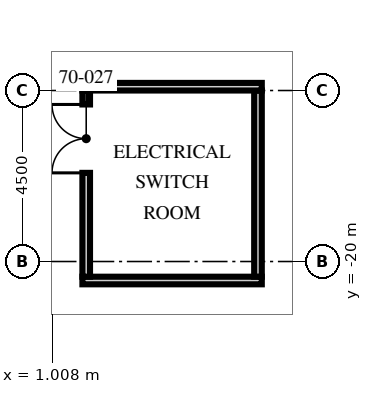
"""IFC4 building model, lengths in metres.
Left out: names, types, materials, properties, quantities, classifications, styles, units other than length and angle.
Written with IfcOpenShell. Run it as: python <this file> out.ifc"""

import sys

from ifc_helpers import new_model, si_unit, direction, frame, frame_2d, origin, origin_2d, place, context, subcontext, project, spatial, rectangle, extrude, element, fill, save


model = new_model("IFC4")
c1 = context("Model", 3, precision=1e-05, world=origin(), true_north=direction((0.0, 1.0)))
c2 = subcontext(c1, "Body", "Model", "MODEL_VIEW")
j1 = project(units=[si_unit("LENGTHUNIT", "METRE"), si_unit("PLANEANGLEUNIT", "RADIAN")], contexts=[c1])
p1 = place(None, origin())
s1 = spatial("IfcSite", under=j1, at=p1, CompositionType="ELEMENT")
p2 = place(p1, origin())
s2 = spatial("IfcBuilding", under=s1, at=p2, CompositionType="ELEMENT")
p3 = place(p2, frame((0.0, 0.0, 278.25)))
s3 = spatial("IfcBuildingStorey", under=s2, at=p3, CompositionType="ELEMENT", Elevation=278.25)
p4 = place(p3, frame((8.32, -24.4, -0.65), z_axis=(-0.103601510687, 0.332963994967, 0.937230870724), x_axis=(0.994618884766, 0.034712905596, 0.097612951251)))
e1 = element("IfcColumn", 1, at=p4, inside=s3, PredefinedType="COLUMN", context=c2, shape_type="SweptSolid", body=[
    extrude(rectangle(XDim=2.8, YDim=1.8, at=origin_2d()), origin(), (0.0, 0.0, 1.0), 8.109),
])
p5 = place(p3, frame((0.0, -24.4, -0.65), z_axis=(0.0, 0.334765406017, 0.942301503201), x_axis=(1.0, 0.0, 0.0)))
e2 = element("IfcColumn", 2, at=p5, inside=s3, PredefinedType="COLUMN", context=c2, shape_type="SweptSolid", body=[
    extrude(rectangle(XDim=2.8, YDim=1.8, at=origin_2d()), origin(), (0.0, 0.0, 1.0), 8.065),
])
p6 = place(p3, frame((1.8, -20.5, 0.0), z_axis=(0.0, 0.0, 1.0), x_axis=(1.0, 0.0, 0.0)))
e3 = element("IfcWall", 3, at=p6, inside=s3, PredefinedType="SOLIDWALL", context=c2, shape_type="SweptSolid", body=[
    extrude(rectangle(XDim=4.72, YDim=0.2, at=frame_2d((2.36, 0.0))), origin(), (0.0, 0.0, 1.0), 6.56),
])
p7 = place(p3, frame((1.9, -20.4, 0.0), z_axis=(0.0, 0.0, 1.0), x_axis=(0.0, 1.0, 0.0)))
e4 = element("IfcWall", 4, at=p7, inside=s3, PredefinedType="SOLIDWALL", context=c2, shape_type="SweptSolid", body=[
    extrude(rectangle(XDim=4.9, YDim=0.2, at=frame_2d((2.45, 0.0))), origin(), (0.0, 0.0, 1.0), 7.25),
])
p8 = place(p7, frame((2.733, 0.0, 0.0)))
e5 = element("IfcOpeningElement", 5, at=p8, cuts=e4, PredefinedType="OPENING", context=c2, shape_type="SweptSolid", body=[
    extrude(rectangle(XDim=1.8, YDim=2.4, at=frame_2d((0.9, 1.2))), frame((0.0, 0.11, 0.0), z_axis=(0.0, -1.0, 0.0), x_axis=(1.0, 0.0, 0.0)), (0.0, 0.0, 1.0), 0.22),
])
p9 = place(p3, frame((6.42, -20.4, 0.0), z_axis=(0.0, 0.0, 1.0), x_axis=(0.0, 1.0, 0.0)))
e6 = element("IfcWall", 6, at=p9, inside=s3, PredefinedType="SOLIDWALL", context=c2, shape_type="SweptSolid", body=[
    extrude(rectangle(XDim=4.9, YDim=0.2, at=frame_2d((2.45, 0.0))), origin(), (0.0, 0.0, 1.0), 7.25),
])
p10 = place(p3, frame((1.8, -15.4, 0.0), z_axis=(0.0, 0.0, 1.0), x_axis=(1.0, 0.0, 0.0)))
e7 = element("IfcWall", 7, at=p10, inside=s3, PredefinedType="SOLIDWALL", context=c2, shape_type="SweptSolid", body=[
    extrude(rectangle(XDim=4.72, YDim=0.2, at=frame_2d((2.36, 0.0))), origin(), (0.0, 0.0, 1.0), 6.56),
])
p11 = place(p8, origin())
e8 = element("IfcDoor", 8, at=p11, inside=s3, OperationType="DOUBLE_DOOR_SINGLE_SWING", PredefinedType="DOOR", context=c2, shape_type="SweptSolid", body=[
    extrude(rectangle(XDim=1.8, YDim=2.4, at=frame_2d((0.9, 1.2))), frame((0.0, 0.025, 0.0), z_axis=(0.0, -1.0, 0.0), x_axis=(1.0, 0.0, 0.0)), (0.0, 0.0, 1.0), 0.05),
])
fill(e5, e8)
save(model, sys.argv[1])
